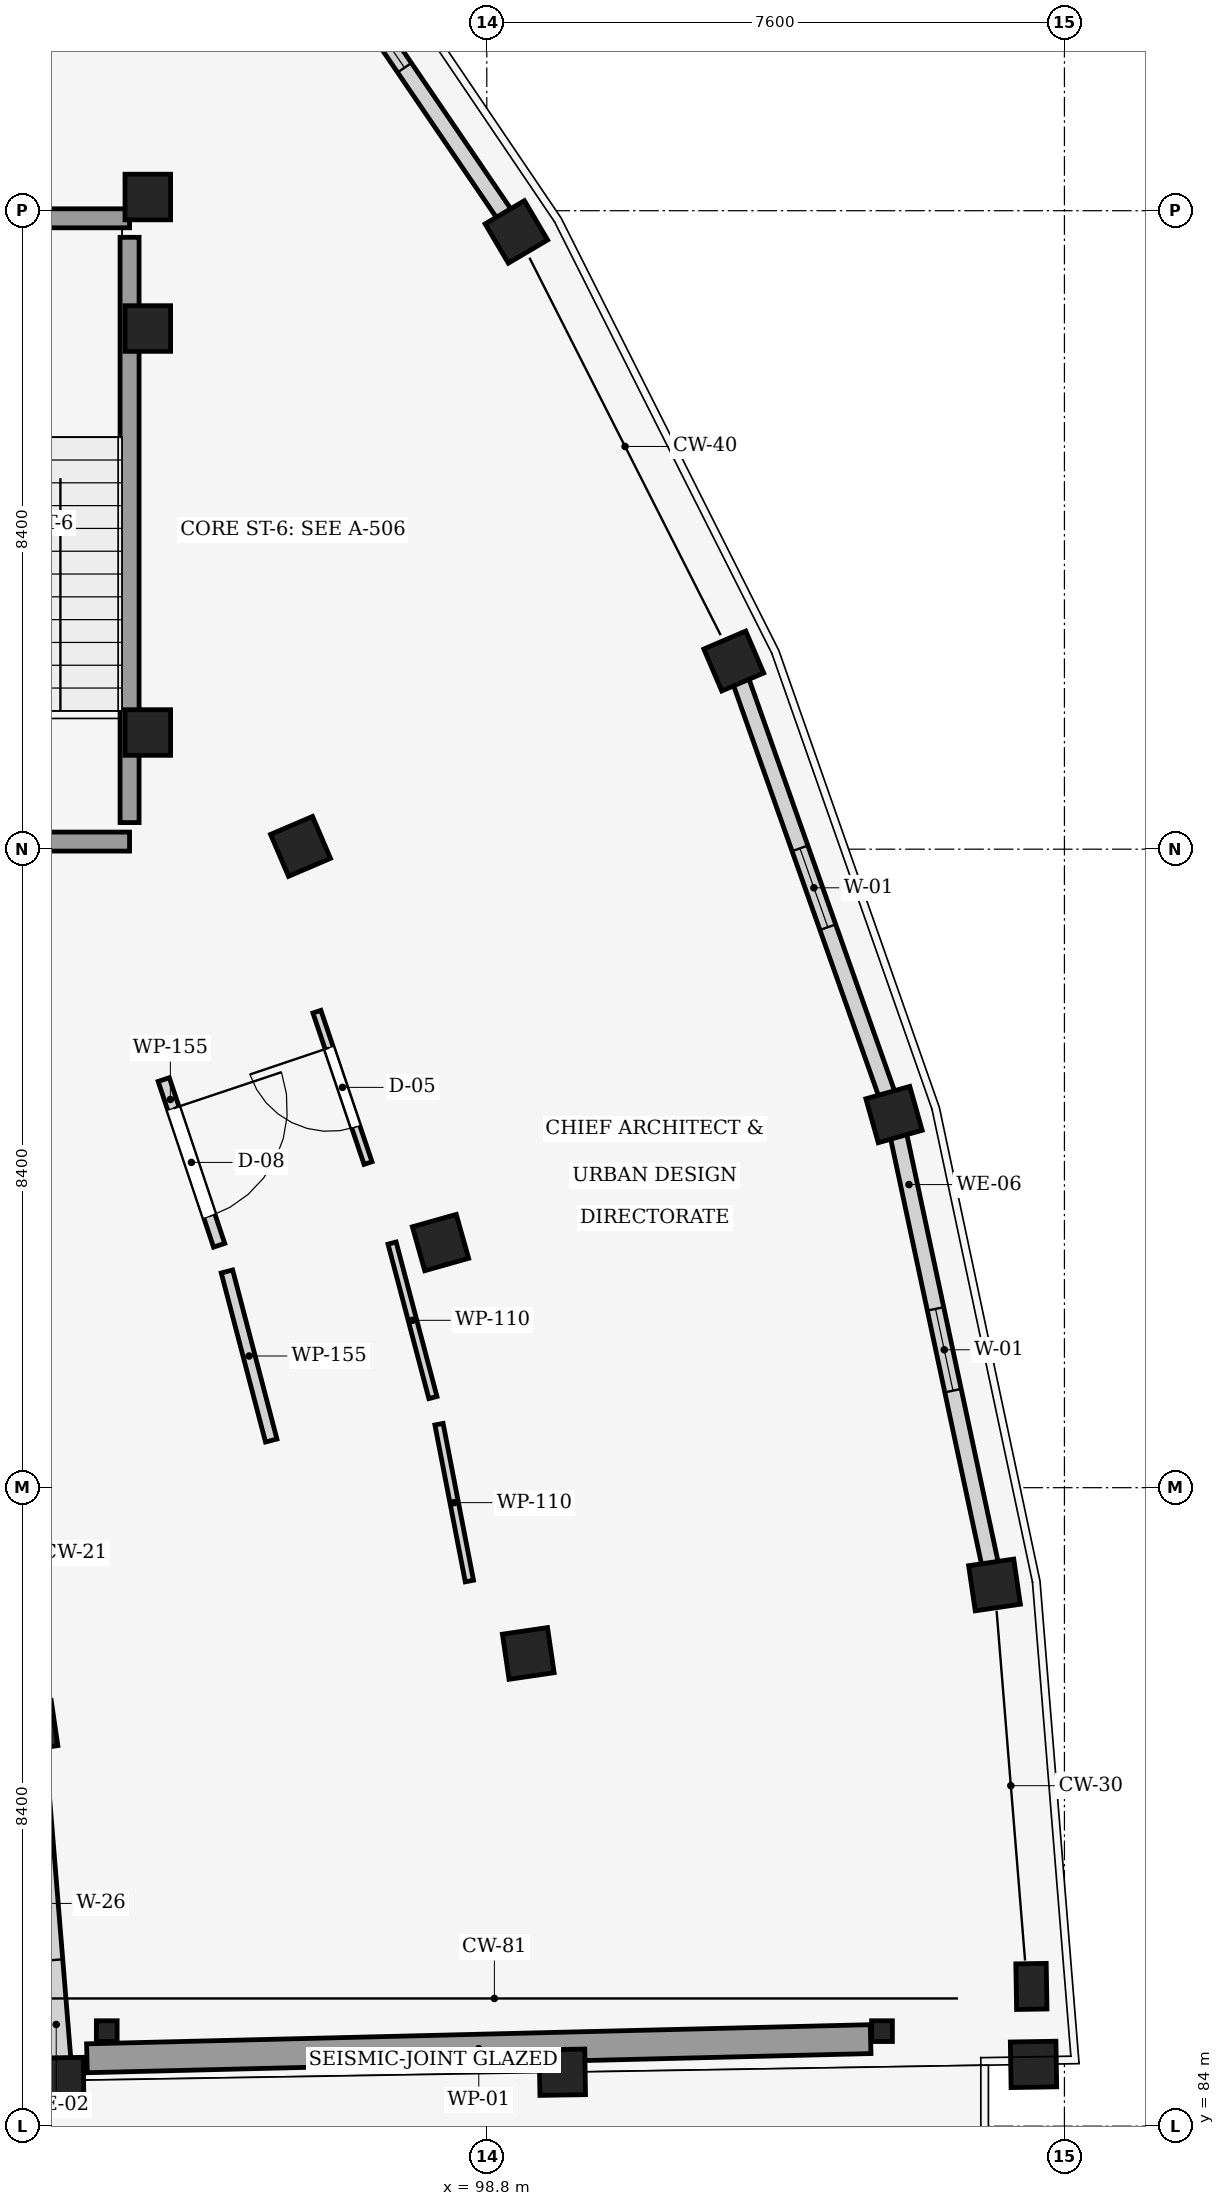
"""IFC4 building model, lengths in metres.
Left out: names, types, materials, properties, quantities, classifications, styles, units other than length and angle.
Written with IfcOpenShell. Run it as: python <this file> out.ifc"""

import sys

from ifc_helpers import new_model, si_unit, direction, frame, frame_2d, origin, origin_2d, place, context, subcontext, project, spatial, rectangle, hollow_circle, extrude, element, fill, save


model = new_model("IFC4")
c1 = context("Model", 3, precision=1e-05, world=origin(), true_north=direction((0.0, 1.0)))
c2 = subcontext(c1, "Body", "Model", "MODEL_VIEW")
j1 = project(units=[si_unit("LENGTHUNIT", "METRE"), si_unit("PLANEANGLEUNIT", "RADIAN")], contexts=[c1])
p1 = place(None, origin())
s1 = spatial("IfcSite", under=j1, at=p1, CompositionType="ELEMENT")
p2 = place(p1, origin())
s2 = spatial("IfcBuilding", under=s1, at=p2, CompositionType="ELEMENT")
p3 = place(p2, frame((0.0, 0.0, 13.2)))
s3 = spatial("IfcBuildingStorey", under=s2, at=p3, CompositionType="ELEMENT", Elevation=13.2)
for number, where, z_axis, x_axis in (
    (1, (93.195, 84.6, 0.0), (0.0, 0.0, 1.0), (1.0, 0.017, 0.0)),
    (2, (99.794, 84.71, 0.0), (0.0, 0.0, 1.0), (1.0, 0.017, 0.0)),
    (3, (105.993, 84.812, 0.0), (0.0, 0.0, 1.0), (1.0, 0.017, 0.0)),
):
    element("IfcColumn", number, at=place(p3, frame(where, z_axis=z_axis, x_axis=x_axis)), inside=s3, PredefinedType="COLUMN", context=c2, shape_type="SweptSolid", body=[
        extrude(rectangle(XDim=0.6, YDim=0.6, at=origin_2d()), origin(), (0.0, 0.0, 1.0), 4.05),
    ])
p4 = place(p3, frame((105.966, 85.838, 0.0), z_axis=(0.0, 0.0, 1.0), x_axis=(0.999862544538, 0.016579868188, 0.0)))
e4 = element("IfcColumn", 4, at=p4, inside=s3, PredefinedType="PILASTER", context=c2, shape_type="SweptSolid", body=[
    extrude(rectangle(XDim=0.4, YDim=0.6, at=origin_2d()), origin(), (0.0, 0.0, 1.0), 4.05),
])
for number, where, z_axis, x_axis in (
    (5, (92.816, 89.26, 0.0), (0.0, 0.0, 1.0), (0.989, 0.145, 0.0)),
    (6, (99.346, 90.219, 0.0), (0.0, 0.0, 1.0), (0.989, 0.145, 0.0)),
    (7, (105.48, 91.12, 0.0), (0.0, 0.0, 1.0), (0.989, 0.145, 0.0)),
    (8, (98.191, 95.625, 0.0), (0.0, 0.0, 1.0), (0.962, 0.272, 0.0)),
    (9, (104.158, 97.309, 0.0), (0.0, 0.0, 1.0), (0.962, 0.272, 0.0)),
    (10, (96.349, 100.837, 0.0), (0.0, 0.0, 1.0), (0.919, 0.393, 0.0)),
    (11, (102.049, 103.276, 0.0), (0.0, 0.0, 1.0), (0.919, 0.393, 0.0)),
    (12, (99.189, 108.921, 0.0), (0.0, 0.0, 1.0), (0.861, 0.509, 0.0)),
):
    element("IfcColumn", number, at=place(p3, frame(where, z_axis=z_axis, x_axis=x_axis)), inside=s3, PredefinedType="COLUMN", context=c2, shape_type="SweptSolid", body=[
        extrude(rectangle(XDim=0.6, YDim=0.6, at=origin_2d()), origin(), (0.0, 0.0, 1.0), 4.05),
    ])
for number, where, z_axis, x_axis in (
    (13, (104.0, 85.25, 0.0), (0.0, 0.0, 1.0), (1.0, 0.0, 0.0)),
    (14, (93.8, 85.25, 0.0), (0.0, 0.0, 1.0), (1.0, 0.0, 0.0)),
):
    element("IfcColumn", number, at=place(p3, frame(where, z_axis=z_axis, x_axis=x_axis)), inside=s3, PredefinedType="COLUMN", context=c2, shape_type="SweptSolid", body=[
        extrude(hollow_circle(Radius=0.136, WallThickness=0.016, at=origin_2d()), origin(), (0.0, 0.0, 1.0), 3.82),
    ])
for number, where, z_axis, x_axis in (
    (15, (94.34, 102.335, 0.0), (0.0, 0.0, 1.0), (1.0, 0.0, 0.0)),
    (16, (94.34, 107.65, 0.0), (0.0, 0.0, 1.0), (1.0, 0.0, 0.0)),
    (17, (94.34, 109.38, 0.0), (0.0, 0.0, 1.0), (1.0, 0.0, 0.0)),
):
    element("IfcColumn", number, at=place(p3, frame(where, z_axis=z_axis, x_axis=x_axis)), inside=s3, PredefinedType="COLUMN", context=c2, shape_type="SweptSolid", body=[
        extrude(rectangle(XDim=0.6, YDim=0.6, at=origin_2d()), origin(), (0.0, 0.0, 1.0), 4.05),
    ])
p5 = place(p3, frame((93.176, 84.835, 0.0), z_axis=(0.0, 0.0, 1.0), x_axis=(-0.081074723481, 0.99670802606, 0.0)))
e18 = element("IfcWall", 18, at=p5, inside=s3, PredefinedType="STANDARD", context=c2, shape_type="SweptSolid", body=[
    extrude(rectangle(XDim=4.204, YDim=0.31, at=frame_2d((2.102, 0.0))), origin(), (0.0, 0.0, 1.0), 3.015),
])
p6 = place(p5, frame((1.352, 0.0, 0.85)))
e19 = element("IfcOpeningElement", 19, at=p6, cuts=e18, PredefinedType="OPENING", context=c2, shape_type="SweptSolid", body=[
    extrude(rectangle(XDim=1.5, YDim=1.85, at=frame_2d((0.75, 0.925))), frame((0.0, 0.165, 0.0), z_axis=(0.0, -1.0, 0.0), x_axis=(1.0, 0.0, 0.0)), (0.0, 0.0, 1.0), 0.33),
])
p7 = place(p3, frame((104.208, 97.074, 0.0), z_axis=(0.0, 0.0, 1.0), x_axis=(0.208873267346, -0.977942717233, 0.0)))
e20 = element("IfcWall", 20, at=p7, inside=s3, PredefinedType="STANDARD", context=c2, shape_type="SweptSolid", body=[
    extrude(rectangle(XDim=5.848, YDim=0.22, at=frame_2d((2.924, 0.0))), origin(), (0.0, 0.0, 1.0), 2.45),
])
p8 = place(p7, frame((2.374, 0.0, 0.85)))
e21 = element("IfcOpeningElement", 21, at=p8, cuts=e20, PredefinedType="OPENING", context=c2, shape_type="SweptSolid", body=[
    extrude(rectangle(XDim=1.1, YDim=1.35, at=frame_2d((0.55, 0.675))), frame((0.0, 0.12, 0.0), z_axis=(0.0, -1.0, 0.0), x_axis=(1.0, 0.0, 0.0)), (0.0, 0.0, 1.0), 0.24),
])
p9 = place(p3, frame((102.132, 103.041, 0.0), z_axis=(0.0, 0.0, 1.0), x_axis=(0.333212182882, -0.942851865978, 0.0)))
e22 = element("IfcWall", 22, at=p9, inside=s3, PredefinedType="STANDARD", context=c2, shape_type="SweptSolid", body=[
    extrude(rectangle(XDim=5.83, YDim=0.22, at=frame_2d((2.915, 0.0))), origin(), (0.0, 0.0, 1.0), 3.015),
])
p10 = place(p9, frame((2.365, 0.0, 0.85)))
e23 = element("IfcOpeningElement", 23, at=p10, cuts=e22, PredefinedType="OPENING", context=c2, shape_type="SweptSolid", body=[
    extrude(rectangle(XDim=1.1, YDim=1.35, at=frame_2d((0.55, 0.675))), frame((0.0, 0.12, 0.0), z_axis=(0.0, -1.0, 0.0), x_axis=(1.0, 0.0, 0.0)), (0.0, 0.0, 1.0), 0.24),
])
p11 = place(p3, frame((95.786, 113.916, 0.0), z_axis=(0.0, 0.0, 1.0), x_axis=(0.563132935525, -0.826366321269, 0.0)))
e24 = element("IfcWall", 24, at=p11, inside=s3, PredefinedType="STANDARD", context=c2, shape_type="SweptSolid", body=[
    extrude(rectangle(XDim=5.76, YDim=0.22, at=frame_2d((2.88, 0.0))), origin(), (0.0, 0.0, 1.0), 3.015),
])
p12 = place(p11, frame((2.33, 0.0, 0.85)))
e25 = element("IfcOpeningElement", 25, at=p12, cuts=e24, PredefinedType="OPENING", context=c2, shape_type="SweptSolid", body=[
    extrude(rectangle(XDim=1.1, YDim=1.35, at=frame_2d((0.55, 0.675))), frame((0.0, 0.12, 0.0), z_axis=(0.0, -1.0, 0.0), x_axis=(1.0, 0.0, 0.0)), (0.0, 0.0, 1.0), 0.24),
])
p13 = place(p3, frame((103.85, 85.145, 0.0), z_axis=(0.0, 0.0, 1.0), x_axis=(-0.999701591947, -0.024427997417, 0.0)))
e26 = element("IfcWall", 26, at=p13, inside=s3, PredefinedType="SHEAR", context=c2, shape_type="SweptSolid", body=[
    extrude(rectangle(XDim=10.314, YDim=0.38, at=frame_2d((5.157, 0.0))), origin(), (0.0, 0.0, 1.0), 3.75),
])
p14 = place(p3, frame((94.1, 100.9, 0.0), z_axis=(0.0, 0.0, 1.0), x_axis=(-1.0, 0.0, 0.0)))
e27 = element("IfcWall", 27, at=p14, inside=s3, PredefinedType="SHEAR", context=c2, shape_type="SweptSolid", body=[
    extrude(rectangle(XDim=3.64, YDim=0.25, at=frame_2d((1.82, 0.0))), origin(), (0.0, 0.0, 1.0), 4.05),
])
p15 = place(p14, frame((1.145, 0.0, 0.0)))
e28 = element("IfcOpeningElement", 28, at=p15, cuts=e27, PredefinedType="OPENING", context=c2, shape_type="SweptSolid", body=[
    extrude(rectangle(XDim=1.35, YDim=2.2, at=frame_2d((0.675, 1.1))), frame((0.0, 0.135, 0.0), z_axis=(0.0, -1.0, 0.0), x_axis=(1.0, 0.0, 0.0)), (0.0, 0.0, 1.0), 0.27),
])
p16 = place(p3, frame((90.46, 109.1, 0.0), z_axis=(0.0, 0.0, 1.0), x_axis=(1.0, 0.0, 0.0)))
e29 = element("IfcWall", 29, at=p16, inside=s3, PredefinedType="SHEAR", context=c2, shape_type="SweptSolid", body=[
    extrude(rectangle(XDim=3.64, YDim=0.25, at=frame_2d((1.82, 0.0))), origin(), (0.0, 0.0, 1.0), 4.05),
])
p17 = place(p3, frame((94.1, 108.85, 0.0), z_axis=(0.0, 0.0, 1.0), x_axis=(0.0, -1.0, 0.0)))
e30 = element("IfcWall", 30, at=p17, inside=s3, PredefinedType="SHEAR", context=c2, shape_type="SweptSolid", body=[
    extrude(rectangle(XDim=7.7, YDim=0.25, at=frame_2d((3.85, 0.0))), origin(), (0.0, 0.0, 1.0), 4.05),
])
p18 = place(p3, frame((98.091, 93.586, 0.0), z_axis=(0.0, 0.0, 1.0), x_axis=(-0.255630783162, 0.96677448389, 0.0)))
e31 = element("IfcWall", 31, at=p18, inside=s3, PredefinedType="PARTITIONING", context=c2, shape_type="SweptSolid", body=[
    extrude(rectangle(XDim=2.102, YDim=0.11, at=frame_2d((1.051, 0.0))), origin(), (0.0, 0.0, 1.0), 3.015),
])
p19 = place(p3, frame((97.237, 96.671, 0.0), z_axis=(0.0, 0.0, 1.0), x_axis=(-0.319884220621, 0.947456640379, 0.0)))
e32 = element("IfcWall", 32, at=p19, inside=s3, PredefinedType="PARTITIONING", context=c2, shape_type="SweptSolid", body=[
    extrude(rectangle(XDim=2.102, YDim=0.11, at=frame_2d((1.051, 0.0))), origin(), (0.0, 0.0, 1.0), 3.7),
])
p20 = place(p19, frame((0.501, 0.0, 0.0)))
e33 = element("IfcOpeningElement", 33, at=p20, cuts=e32, PredefinedType="OPENING", context=c2, shape_type="SweptSolid", body=[
    extrude(rectangle(XDim=1.1, YDim=2.1, at=frame_2d((0.55, 1.05))), frame((0.0, 0.065, 0.0), z_axis=(0.0, -1.0, 0.0), x_axis=(1.0, 0.0, 0.0)), (0.0, 0.0, 1.0), 0.13),
])
p21 = place(p3, frame((98.571, 91.171, 0.0), z_axis=(0.0, 0.0, 1.0), x_axis=(-0.19012663252, 0.981759575256, 0.0)))
e34 = element("IfcWall", 34, at=p21, inside=s3, PredefinedType="PARTITIONING", context=c2, shape_type="SweptSolid", body=[
    extrude(rectangle(XDim=2.102, YDim=0.11, at=frame_2d((1.051, 0.0))), origin(), (0.0, 0.0, 1.0), 3.7),
])
p22 = place(p3, frame((94.55, 97.769, 0.0), z_axis=(0.0, 0.0, 1.0), x_axis=(0.317151668087, -0.94837483066, 0.0)))
e35 = element("IfcWall", 35, at=p22, inside=s3, PredefinedType="PARTITIONING", context=c2, shape_type="SweptSolid", body=[
    extrude(rectangle(XDim=2.299, YDim=0.155, at=frame_2d((1.149, 0.0))), origin(), (0.0, 0.0, 1.0), 3.7),
])
p23 = place(p22, frame((0.399, 0.0, 0.0)))
e36 = element("IfcOpeningElement", 36, at=p23, cuts=e35, PredefinedType="OPENING", context=c2, shape_type="SweptSolid", body=[
    extrude(rectangle(XDim=1.5, YDim=2.1, at=frame_2d((0.75, 1.05))), frame((0.0, 0.087, 0.0), z_axis=(0.0, -1.0, 0.0), x_axis=(1.0, 0.0, 0.0)), (0.0, 0.0, 1.0), 0.175),
])
p24 = place(p3, frame((95.381, 95.244, 0.0), z_axis=(0.0, 0.0, 1.0), x_axis=(0.253416186792, -0.96735734673, 0.0)))
e37 = element("IfcWall", 37, at=p24, inside=s3, PredefinedType="PARTITIONING", context=c2, shape_type="SweptSolid", body=[
    extrude(rectangle(XDim=2.299, YDim=0.155, at=frame_2d((1.149, 0.0))), origin(), (0.0, 0.0, 1.0), 3.015),
])
p25 = place(p6, origin())
e38 = element("IfcWindow", 38, at=p25, inside=s3, PartitioningType="SINGLE_PANEL", PredefinedType="WINDOW", context=c2, shape_type="SweptSolid", body=[
    extrude(rectangle(XDim=1.5, YDim=1.85, at=frame_2d((0.75, 0.925))), frame((0.0, 0.03, 0.0), z_axis=(0.0, -1.0, 0.0), x_axis=(1.0, 0.0, 0.0)), (0.0, 0.0, 1.0), 0.06),
])
fill(e19, e38)
p26 = place(p8, origin())
e39 = element("IfcWindow", 39, at=p26, inside=s3, PartitioningType="SINGLE_PANEL", PredefinedType="WINDOW", context=c2, shape_type="SweptSolid", body=[
    extrude(rectangle(XDim=1.1, YDim=1.35, at=frame_2d((0.55, 0.675))), frame((0.0, 0.03, 0.0), z_axis=(0.0, -1.0, 0.0), x_axis=(1.0, 0.0, 0.0)), (0.0, 0.0, 1.0), 0.06),
])
fill(e21, e39)
p27 = place(p10, origin())
e40 = element("IfcWindow", 40, at=p27, inside=s3, PartitioningType="SINGLE_PANEL", PredefinedType="WINDOW", context=c2, shape_type="SweptSolid", body=[
    extrude(rectangle(XDim=1.1, YDim=1.35, at=frame_2d((0.55, 0.675))), frame((0.0, 0.03, 0.0), z_axis=(0.0, -1.0, 0.0), x_axis=(1.0, 0.0, 0.0)), (0.0, 0.0, 1.0), 0.06),
])
fill(e23, e40)
p28 = place(p12, origin())
e41 = element("IfcWindow", 41, at=p28, inside=s3, PartitioningType="SINGLE_PANEL", PredefinedType="WINDOW", context=c2, shape_type="SweptSolid", body=[
    extrude(rectangle(XDim=1.1, YDim=1.35, at=frame_2d((0.55, 0.675))), frame((0.0, 0.03, 0.0), z_axis=(0.0, -1.0, 0.0), x_axis=(1.0, 0.0, 0.0)), (0.0, 0.0, 1.0), 0.06),
])
fill(e25, e41)
p29 = place(p20, origin())
e42 = element("IfcDoor", 42, at=p29, inside=s3, OperationType="SINGLE_SWING_RIGHT", PredefinedType="DOOR", context=c2, shape_type="SweptSolid", body=[
    extrude(rectangle(XDim=1.1, YDim=2.1, at=frame_2d((0.55, 1.05))), frame((0.0, 0.025, 0.0), z_axis=(0.0, -1.0, 0.0), x_axis=(1.0, 0.0, 0.0)), (0.0, 0.0, 1.0), 0.05),
])
fill(e33, e42)
p30 = place(p23, origin())
e43 = element("IfcDoor", 43, at=p30, inside=s3, OperationType="SINGLE_SWING_LEFT", PredefinedType="DOOR", context=c2, shape_type="SweptSolid", body=[
    extrude(rectangle(XDim=1.5, YDim=2.1, at=frame_2d((0.75, 1.05))), frame((0.0, 0.025, 0.0), z_axis=(0.0, -1.0, 0.0), x_axis=(1.0, 0.0, 0.0)), (0.0, 0.0, 1.0), 0.05),
])
fill(e36, e43)
save(model, sys.argv[1])
